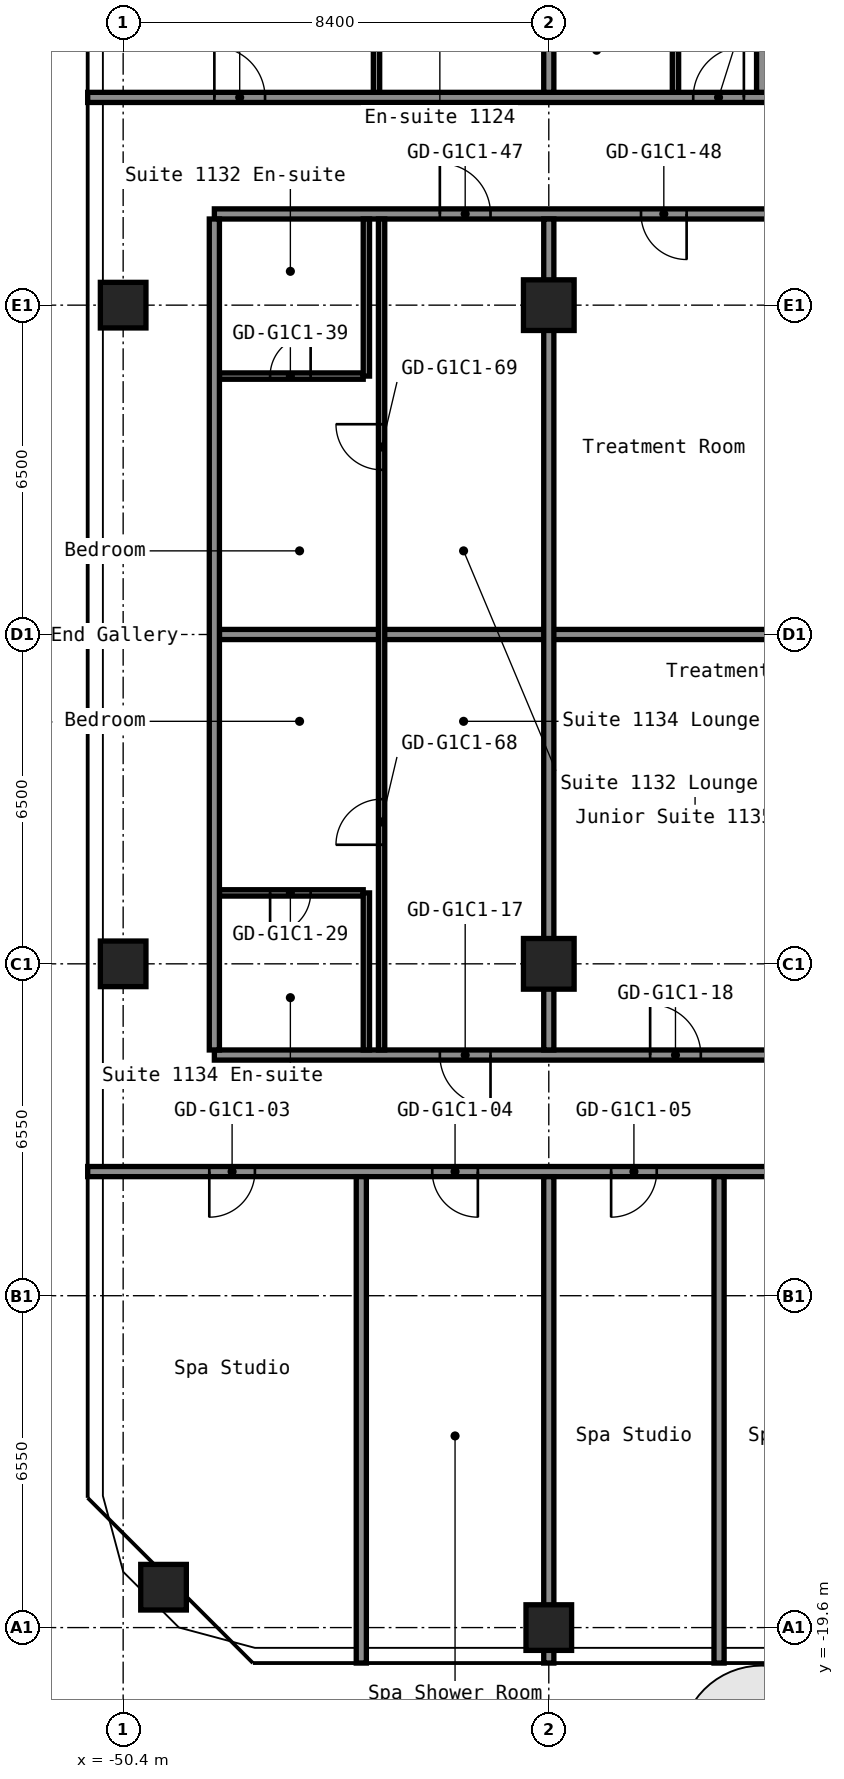
"""IFC4 building model, lengths in metres.
Left out: names, types, materials, properties, quantities, classifications, styles, units other than length and angle.
Written with IfcOpenShell. Run it as: python <this file> out.ifc"""

import sys

from ifc_helpers import new_model, si_unit, direction, frame, frame_2d, origin, origin_2d, place, context, subcontext, project, spatial, rectangle, hollow_rectangle, extrude, element, fill, save


model = new_model("IFC4")
c1 = context("Model", 3, precision=1e-05, world=origin(), true_north=direction((0.0, 1.0)))
c2 = subcontext(c1, "Body", "Model", "MODEL_VIEW")
j1 = project(units=[si_unit("LENGTHUNIT", "METRE"), si_unit("PLANEANGLEUNIT", "RADIAN")], contexts=[c1])
p1 = place(None, origin())
s1 = spatial("IfcSite", under=j1, at=p1, CompositionType="ELEMENT")
p2 = place(p1, origin())
s2 = spatial("IfcBuilding", under=s1, at=p2, CompositionType="ELEMENT")
p3 = place(p2, frame((0.0, 0.0, 42.2)))
s3 = spatial("IfcBuildingStorey", under=s2, at=p3, CompositionType="ELEMENT", Elevation=42.2)
for number, where, z_axis, x_axis in (
    (1, (-49.603, -18.803, 0.0), (0.0, 0.0, 1.0), (1.0, 0.0, 0.0)),
    (2, (-50.4, -6.5, 0.0), (0.0, 0.0, 1.0), (1.0, 0.0, 0.0)),
    (3, (-50.4, 6.5, 0.0), (0.0, 0.0, 1.0), (1.0, 0.0, 0.0)),
    (4, (-42.0, -19.6, 0.0), (0.0, 0.0, 1.0), (1.0, 0.0, 0.0)),
):
    element("IfcColumn", number, at=place(p3, frame(where, z_axis=z_axis, x_axis=x_axis)), inside=s3, PredefinedType="COLUMN", context=c2, shape_type="SweptSolid", body=[
        extrude(hollow_rectangle(XDim=0.9, YDim=0.9, WallThickness=0.036, at=origin_2d()), origin(), (0.0, 0.0, 1.0), 2.8),
    ])
for number, where, z_axis, x_axis in (
    (5, (-42.0, -6.5, 0.0), (0.0, 0.0, 1.0), (1.0, 0.0, 0.0)),
    (6, (-42.0, 6.5, 0.0), (0.0, 0.0, 1.0), (1.0, 0.0, 0.0)),
):
    element("IfcColumn", number, at=place(p3, frame(where, z_axis=z_axis, x_axis=x_axis)), inside=s3, PredefinedType="COLUMN", context=c2, shape_type="SweptSolid", body=[
        extrude(hollow_rectangle(XDim=1.0, YDim=1.0, WallThickness=0.04, at=origin_2d()), origin(), (0.0, 0.0, 1.0), 2.8),
    ])
p4 = place(p3, frame((-51.1, -10.6, 0.0), z_axis=(0.0, 0.0, 1.0), x_axis=(1.0, 0.0, 0.0)))
e7 = element("IfcWall", 7, at=p4, inside=s3, PredefinedType="PARTITIONING", context=c2, shape_type="SweptSolid", body=[
    extrude(rectangle(XDim=34.3, YDim=0.2, at=frame_2d((17.15, 0.0))), origin(), (0.0, 0.0, 1.0), 2.8),
])
p5 = place(p4, frame((2.4, 0.0, 0.0)))
e8 = element("IfcOpeningElement", 8, at=p5, cuts=e7, PredefinedType="OPENING", context=c2, shape_type="SweptSolid", body=[
    extrude(rectangle(XDim=0.9, YDim=2.1, at=frame_2d((0.45, 1.05))), frame((0.0, 0.11, 0.0), z_axis=(0.0, -1.0, 0.0), x_axis=(1.0, 0.0, 0.0)), (0.0, 0.0, 1.0), 0.22),
])
p6 = place(p4, frame((6.8, 0.0, 0.0)))
e9 = element("IfcOpeningElement", 9, at=p6, cuts=e7, PredefinedType="OPENING", context=c2, shape_type="SweptSolid", body=[
    extrude(rectangle(XDim=0.9, YDim=2.1, at=frame_2d((0.45, 1.05))), frame((0.0, 0.11, 0.0), z_axis=(0.0, -1.0, 0.0), x_axis=(1.0, 0.0, 0.0)), (0.0, 0.0, 1.0), 0.22),
])
p7 = place(p4, frame((10.33, 0.0, 0.0)))
e10 = element("IfcOpeningElement", 10, at=p7, cuts=e7, PredefinedType="OPENING", context=c2, shape_type="SweptSolid", body=[
    extrude(rectangle(XDim=0.9, YDim=2.1, at=frame_2d((0.45, 1.05))), frame((0.0, 0.11, 0.0), z_axis=(0.0, -1.0, 0.0), x_axis=(1.0, 0.0, 0.0)), (0.0, 0.0, 1.0), 0.22),
])
p8 = place(p4, frame((14.53, 0.0, 0.0)))
e11 = element("IfcOpeningElement", 11, at=p8, cuts=e7, PredefinedType="OPENING", context=c2, shape_type="SweptSolid", body=[
    extrude(rectangle(XDim=0.9, YDim=2.1, at=frame_2d((0.45, 1.05))), frame((0.0, 0.11, 0.0), z_axis=(0.0, -1.0, 0.0), x_axis=(1.0, 0.0, 0.0)), (0.0, 0.0, 1.0), 0.22),
])
p9 = place(p4, frame((21.2, 0.0, 0.0)))
e12 = element("IfcOpeningElement", 12, at=p9, cuts=e7, PredefinedType="OPENING", context=c2, shape_type="SweptSolid", body=[
    extrude(rectangle(XDim=1.0, YDim=2.1, at=frame_2d((0.5, 1.05))), frame((0.0, 0.11, 0.0), z_axis=(0.0, -1.0, 0.0), x_axis=(1.0, 0.0, 0.0)), (0.0, 0.0, 1.0), 0.22),
])
p10 = place(p4, frame((28.055, 0.0, 0.0)))
e13 = element("IfcOpeningElement", 13, at=p10, cuts=e7, PredefinedType="OPENING", context=c2, shape_type="SweptSolid", body=[
    extrude(rectangle(XDim=0.9, YDim=2.1, at=frame_2d((0.45, 1.05))), frame((0.0, 0.11, 0.0), z_axis=(0.0, -1.0, 0.0), x_axis=(1.0, 0.0, 0.0)), (0.0, 0.0, 1.0), 0.22),
])
p11 = place(p4, frame((32.255, 0.0, 0.0)))
e14 = element("IfcOpeningElement", 14, at=p11, cuts=e7, PredefinedType="OPENING", context=c2, shape_type="SweptSolid", body=[
    extrude(rectangle(XDim=0.9, YDim=2.1, at=frame_2d((0.45, 1.05))), frame((0.0, 0.11, 0.0), z_axis=(0.0, -1.0, 0.0), x_axis=(1.0, 0.0, 0.0)), (0.0, 0.0, 1.0), 0.22),
])
p12 = place(p3, frame((-48.6, -8.3, 0.0), z_axis=(0.0, 0.0, 1.0), x_axis=(1.0, 0.0, 0.0)))
e15 = element("IfcWall", 15, at=p12, inside=s3, PredefinedType="PARTITIONING", context=c2, shape_type="SweptSolid", body=[
    extrude(rectangle(XDim=15.0, YDim=0.2, at=frame_2d((7.5, 0.0))), origin(), (0.0, 0.0, 1.0), 2.8),
])
p13 = place(p12, frame((4.45, 0.0, 0.0)))
e16 = element("IfcOpeningElement", 16, at=p13, cuts=e15, PredefinedType="OPENING", context=c2, shape_type="SweptSolid", body=[
    extrude(rectangle(XDim=1.0, YDim=2.1, at=frame_2d((0.5, 1.05))), frame((0.0, 0.11, 0.0), z_axis=(0.0, -1.0, 0.0), x_axis=(1.0, 0.0, 0.0)), (0.0, 0.0, 1.0), 0.22),
])
p14 = place(p12, frame((8.6, 0.0, 0.0)))
e17 = element("IfcOpeningElement", 17, at=p14, cuts=e15, PredefinedType="OPENING", context=c2, shape_type="SweptSolid", body=[
    extrude(rectangle(XDim=1.0, YDim=2.1, at=frame_2d((0.5, 1.05))), frame((0.0, 0.11, 0.0), z_axis=(0.0, -1.0, 0.0), x_axis=(1.0, 0.0, 0.0)), (0.0, 0.0, 1.0), 0.22),
])
p15 = place(p3, frame((-48.5, -5.1, 0.0), z_axis=(0.0, 0.0, 1.0), x_axis=(1.0, 0.0, 0.0)))
e18 = element("IfcWall", 18, at=p15, inside=s3, PredefinedType="PARTITIONING", context=c2, shape_type="SweptSolid", body=[
    extrude(rectangle(XDim=2.837, YDim=0.125, at=frame_2d((1.419, 0.0))), origin(), (0.0, 0.0, 1.0), 2.8),
])
p16 = place(p15, frame((1.0, 0.0, 0.0)))
e19 = element("IfcOpeningElement", 19, at=p16, cuts=e18, PredefinedType="OPENING", context=c2, shape_type="SweptSolid", body=[
    extrude(rectangle(XDim=0.8, YDim=2.1, at=frame_2d((0.4, 1.05))), frame((0.0, 0.073, 0.0), z_axis=(0.0, -1.0, 0.0), x_axis=(1.0, 0.0, 0.0)), (0.0, 0.0, 1.0), 0.145),
])
p17 = place(p3, frame((-48.5, 0.0, 0.0), z_axis=(0.0, 0.0, 1.0), x_axis=(1.0, 0.0, 0.0)))
e20 = element("IfcWall", 20, at=p17, inside=s3, PredefinedType="PARTITIONING", context=c2, shape_type="SweptSolid", body=[
    extrude(rectangle(XDim=14.9, YDim=0.2, at=frame_2d((7.45, 0.0))), origin(), (0.0, 0.0, 1.0), 2.8),
])
p18 = place(p3, frame((-48.5, 5.1, 0.0), z_axis=(0.0, 0.0, 1.0), x_axis=(1.0, 0.0, 0.0)))
e21 = element("IfcWall", 21, at=p18, inside=s3, PredefinedType="PARTITIONING", context=c2, shape_type="SweptSolid", body=[
    extrude(rectangle(XDim=2.837, YDim=0.125, at=frame_2d((1.419, 0.0))), origin(), (0.0, 0.0, 1.0), 2.8),
])
p19 = place(p18, frame((1.0, 0.0, 0.0)))
e22 = element("IfcOpeningElement", 22, at=p19, cuts=e21, PredefinedType="OPENING", context=c2, shape_type="SweptSolid", body=[
    extrude(rectangle(XDim=0.8, YDim=2.1, at=frame_2d((0.4, 1.05))), frame((0.0, 0.073, 0.0), z_axis=(0.0, -1.0, 0.0), x_axis=(1.0, 0.0, 0.0)), (0.0, 0.0, 1.0), 0.145),
])
p20 = place(p3, frame((-48.6, 8.3, 0.0), z_axis=(0.0, 0.0, 1.0), x_axis=(1.0, 0.0, 0.0)))
e23 = element("IfcWall", 23, at=p20, inside=s3, PredefinedType="PARTITIONING", context=c2, shape_type="SweptSolid", body=[
    extrude(rectangle(XDim=15.0, YDim=0.2, at=frame_2d((7.5, 0.0))), origin(), (0.0, 0.0, 1.0), 2.8),
])
p21 = place(p20, frame((4.45, 0.0, 0.0)))
e24 = element("IfcOpeningElement", 24, at=p21, cuts=e23, PredefinedType="OPENING", context=c2, shape_type="SweptSolid", body=[
    extrude(rectangle(XDim=1.0, YDim=2.1, at=frame_2d((0.5, 1.05))), frame((0.0, 0.11, 0.0), z_axis=(0.0, -1.0, 0.0), x_axis=(1.0, 0.0, 0.0)), (0.0, 0.0, 1.0), 0.22),
])
p22 = place(p20, frame((8.42, 0.0, 0.0)))
e25 = element("IfcOpeningElement", 25, at=p22, cuts=e23, PredefinedType="OPENING", context=c2, shape_type="SweptSolid", body=[
    extrude(rectangle(XDim=0.9, YDim=2.1, at=frame_2d((0.45, 1.05))), frame((0.0, 0.11, 0.0), z_axis=(0.0, -1.0, 0.0), x_axis=(1.0, 0.0, 0.0)), (0.0, 0.0, 1.0), 0.22),
])
p23 = place(p20, frame((12.62, 0.0, 0.0)))
e26 = element("IfcOpeningElement", 26, at=p23, cuts=e23, PredefinedType="OPENING", context=c2, shape_type="SweptSolid", body=[
    extrude(rectangle(XDim=0.9, YDim=2.1, at=frame_2d((0.45, 1.05))), frame((0.0, 0.11, 0.0), z_axis=(0.0, -1.0, 0.0), x_axis=(1.0, 0.0, 0.0)), (0.0, 0.0, 1.0), 0.22),
])
p24 = place(p3, frame((-51.1, 10.6, 0.0), z_axis=(0.0, 0.0, 1.0), x_axis=(1.0, 0.0, 0.0)))
e27 = element("IfcWall", 27, at=p24, inside=s3, PredefinedType="PARTITIONING", context=c2, shape_type="SweptSolid", body=[
    extrude(rectangle(XDim=34.3, YDim=0.2, at=frame_2d((17.15, 0.0))), origin(), (0.0, 0.0, 1.0), 2.8),
])
p25 = place(p24, frame((2.5, 0.0, 0.0)))
e28 = element("IfcOpeningElement", 28, at=p25, cuts=e27, PredefinedType="OPENING", context=c2, shape_type="SweptSolid", body=[
    extrude(rectangle(XDim=1.0, YDim=2.1, at=frame_2d((0.5, 1.05))), frame((0.0, 0.11, 0.0), z_axis=(0.0, -1.0, 0.0), x_axis=(1.0, 0.0, 0.0)), (0.0, 0.0, 1.0), 0.22),
])
p26 = place(p24, frame((11.95, 0.0, 0.0)))
e29 = element("IfcOpeningElement", 29, at=p26, cuts=e27, PredefinedType="OPENING", context=c2, shape_type="SweptSolid", body=[
    extrude(rectangle(XDim=1.0, YDim=2.1, at=frame_2d((0.5, 1.05))), frame((0.0, 0.11, 0.0), z_axis=(0.0, -1.0, 0.0), x_axis=(1.0, 0.0, 0.0)), (0.0, 0.0, 1.0), 0.22),
])
p27 = place(p24, frame((13.65, 0.0, 0.0)))
e30 = element("IfcOpeningElement", 30, at=p27, cuts=e27, PredefinedType="OPENING", context=c2, shape_type="SweptSolid", body=[
    extrude(rectangle(XDim=1.0, YDim=2.1, at=frame_2d((0.5, 1.05))), frame((0.0, 0.11, 0.0), z_axis=(0.0, -1.0, 0.0), x_axis=(1.0, 0.0, 0.0)), (0.0, 0.0, 1.0), 0.22),
])
p28 = place(p24, frame((22.9, 0.0, 0.0)))
e31 = element("IfcOpeningElement", 31, at=p28, cuts=e27, PredefinedType="OPENING", context=c2, shape_type="SweptSolid", body=[
    extrude(rectangle(XDim=1.0, YDim=2.1, at=frame_2d((0.5, 1.05))), frame((0.0, 0.11, 0.0), z_axis=(0.0, -1.0, 0.0), x_axis=(1.0, 0.0, 0.0)), (0.0, 0.0, 1.0), 0.22),
])
p29 = place(p24, frame((28.75, 0.0, 0.0)))
e32 = element("IfcOpeningElement", 32, at=p29, cuts=e27, PredefinedType="OPENING", context=c2, shape_type="SweptSolid", body=[
    extrude(rectangle(XDim=1.0, YDim=2.1, at=frame_2d((0.5, 1.05))), frame((0.0, 0.11, 0.0), z_axis=(0.0, -1.0, 0.0), x_axis=(1.0, 0.0, 0.0)), (0.0, 0.0, 1.0), 0.22),
])
p30 = place(p24, frame((30.45, 0.0, 0.0)))
e33 = element("IfcOpeningElement", 33, at=p30, cuts=e27, PredefinedType="OPENING", context=c2, shape_type="SweptSolid", body=[
    extrude(rectangle(XDim=1.0, YDim=2.1, at=frame_2d((0.5, 1.05))), frame((0.0, 0.11, 0.0), z_axis=(0.0, -1.0, 0.0), x_axis=(1.0, 0.0, 0.0)), (0.0, 0.0, 1.0), 0.22),
])
p31 = place(p3, frame((-48.6, -8.2, 0.0), z_axis=(0.0, 0.0, 1.0), x_axis=(0.0, 1.0, 0.0)))
e34 = element("IfcWall", 34, at=p31, inside=s3, PredefinedType="PARTITIONING", context=c2, shape_type="SweptSolid", body=[
    extrude(rectangle(XDim=16.4, YDim=0.2, at=frame_2d((8.2, 0.0))), origin(), (0.0, 0.0, 1.0), 2.8),
])
p32 = place(p3, frame((-45.7, -20.3, 0.0), z_axis=(0.0, 0.0, 1.0), x_axis=(0.0, 1.0, 0.0)))
e35 = element("IfcWall", 35, at=p32, inside=s3, PredefinedType="PARTITIONING", context=c2, shape_type="SweptSolid", body=[
    extrude(rectangle(XDim=9.6, YDim=0.2, at=frame_2d((4.8, 0.0))), origin(), (0.0, 0.0, 1.0), 2.8),
])
for number, where, z_axis, x_axis in (
    (36, (-45.6, -8.2, 0.0), (0.0, 0.0, 1.0), (0.0, 1.0, 0.0)),
    (37, (-45.6, 5.1, 0.0), (0.0, 0.0, 1.0), (0.0, 1.0, 0.0)),
):
    element("IfcWall", number, at=place(p3, frame(where, z_axis=z_axis, x_axis=x_axis)), inside=s3, PredefinedType="PARTITIONING", context=c2, shape_type="SweptSolid", body=[
        extrude(rectangle(XDim=3.1, YDim=0.125, at=frame_2d((1.55, 0.0))), origin(), (0.0, 0.0, 1.0), 2.8),
    ])
p33 = place(p3, frame((-45.4, 10.7, 0.0), z_axis=(0.0, 0.0, 1.0), x_axis=(0.0, 1.0, 0.0)))
e38 = element("IfcWall", 38, at=p33, inside=s3, PredefinedType="PARTITIONING", context=c2, shape_type="SweptSolid", body=[
    extrude(rectangle(XDim=3.3, YDim=0.125, at=frame_2d((1.65, 0.0))), origin(), (0.0, 0.0, 1.0), 2.8),
])
p34 = place(p3, frame((-45.3, -8.2, 0.0), z_axis=(0.0, 0.0, 1.0), x_axis=(0.0, 1.0, 0.0)))
e39 = element("IfcWall", 39, at=p34, inside=s3, PredefinedType="PARTITIONING", context=c2, shape_type="SweptSolid", body=[
    extrude(rectangle(XDim=16.4, YDim=0.125, at=frame_2d((8.2, 0.0))), origin(), (0.0, 0.0, 1.0), 2.8),
])
p35 = place(p34, frame((4.05, 0.0, 0.0)))
e40 = element("IfcOpeningElement", 40, at=p35, cuts=e39, PredefinedType="OPENING", context=c2, shape_type="SweptSolid", body=[
    extrude(rectangle(XDim=0.9, YDim=2.1, at=frame_2d((0.45, 1.05))), frame((0.0, 0.073, 0.0), z_axis=(0.0, -1.0, 0.0), x_axis=(1.0, 0.0, 0.0)), (0.0, 0.0, 1.0), 0.145),
])
p36 = place(p34, frame((11.45, 0.0, 0.0)))
e41 = element("IfcOpeningElement", 41, at=p36, cuts=e39, PredefinedType="OPENING", context=c2, shape_type="SweptSolid", body=[
    extrude(rectangle(XDim=0.9, YDim=2.1, at=frame_2d((0.45, 1.05))), frame((0.0, 0.073, 0.0), z_axis=(0.0, -1.0, 0.0), x_axis=(1.0, 0.0, 0.0)), (0.0, 0.0, 1.0), 0.145),
])
p37 = place(p3, frame((-42.0, -20.3, 0.0), z_axis=(0.0, 0.0, 1.0), x_axis=(0.0, 1.0, 0.0)))
e42 = element("IfcWall", 42, at=p37, inside=s3, PredefinedType="PARTITIONING", context=c2, shape_type="SweptSolid", body=[
    extrude(rectangle(XDim=9.6, YDim=0.2, at=frame_2d((4.8, 0.0))), origin(), (0.0, 0.0, 1.0), 2.8),
])
p38 = place(p3, frame((-42.0, -8.2, 0.0), z_axis=(0.0, 0.0, 1.0), x_axis=(0.0, 1.0, 0.0)))
e43 = element("IfcWall", 43, at=p38, inside=s3, PredefinedType="PARTITIONING", context=c2, shape_type="SweptSolid", body=[
    extrude(rectangle(XDim=16.4, YDim=0.2, at=frame_2d((8.2, 0.0))), origin(), (0.0, 0.0, 1.0), 2.8),
])
p39 = place(p3, frame((-42.0, 10.7, 0.0), z_axis=(0.0, 0.0, 1.0), x_axis=(0.0, 1.0, 0.0)))
e44 = element("IfcWall", 44, at=p39, inside=s3, PredefinedType="PARTITIONING", context=c2, shape_type="SweptSolid", body=[
    extrude(rectangle(XDim=9.6, YDim=0.2, at=frame_2d((4.8, 0.0))), origin(), (0.0, 0.0, 1.0), 2.8),
])
p40 = place(p3, frame((-39.5, 10.7, 0.0), z_axis=(0.0, 0.0, 1.0), x_axis=(0.0, 1.0, 0.0)))
e45 = element("IfcWall", 45, at=p40, inside=s3, PredefinedType="PARTITIONING", context=c2, shape_type="SweptSolid", body=[
    extrude(rectangle(XDim=2.9, YDim=0.125, at=frame_2d((1.45, 0.0))), origin(), (0.0, 0.0, 1.0), 2.8),
])
p41 = place(p40, frame((1.5, 0.0, 0.0)))
e46 = element("IfcOpeningElement", 46, at=p41, cuts=e45, PredefinedType="OPENING", context=c2, shape_type="SweptSolid", body=[
    extrude(rectangle(XDim=0.8, YDim=2.1, at=frame_2d((0.4, 1.05))), frame((0.0, 0.073, 0.0), z_axis=(0.0, -1.0, 0.0), x_axis=(1.0, 0.0, 0.0)), (0.0, 0.0, 1.0), 0.145),
])
for number, where, z_axis, x_axis in (
    (47, (-38.64, -20.3, 0.0), (0.0, 0.0, 1.0), (0.0, 1.0, 0.0)),
    (48, (-37.8, 10.7, 0.0), (0.0, 0.0, 1.0), (0.0, 1.0, 0.0)),
):
    element("IfcWall", number, at=place(p3, frame(where, z_axis=z_axis, x_axis=x_axis)), inside=s3, PredefinedType="PARTITIONING", context=c2, shape_type="SweptSolid", body=[
        extrude(rectangle(XDim=9.6, YDim=0.2, at=frame_2d((4.8, 0.0))), origin(), (0.0, 0.0, 1.0), 2.8),
    ])
p42 = place(p5, origin())
e49 = element("IfcDoor", 49, at=p42, inside=s3, OperationType="SINGLE_SWING_LEFT", PredefinedType="DOOR", context=c2, shape_type="SweptSolid", body=[
    extrude(rectangle(XDim=0.9, YDim=2.1, at=frame_2d((0.45, 1.05))), frame((0.0, 0.025, 0.0), z_axis=(0.0, -1.0, 0.0), x_axis=(1.0, 0.0, 0.0)), (0.0, 0.0, 1.0), 0.05),
])
fill(e8, e49)
p43 = place(p6, origin())
e50 = element("IfcDoor", 50, at=p43, inside=s3, OperationType="SINGLE_SWING_RIGHT", PredefinedType="DOOR", context=c2, shape_type="SweptSolid", body=[
    extrude(rectangle(XDim=0.9, YDim=2.1, at=frame_2d((0.45, 1.05))), frame((0.0, 0.025, 0.0), z_axis=(0.0, -1.0, 0.0), x_axis=(1.0, 0.0, 0.0)), (0.0, 0.0, 1.0), 0.05),
])
fill(e9, e50)
p44 = place(p7, origin())
e51 = element("IfcDoor", 51, at=p44, inside=s3, OperationType="SINGLE_SWING_LEFT", PredefinedType="DOOR", context=c2, shape_type="SweptSolid", body=[
    extrude(rectangle(XDim=0.9, YDim=2.1, at=frame_2d((0.45, 1.05))), frame((0.0, 0.025, 0.0), z_axis=(0.0, -1.0, 0.0), x_axis=(1.0, 0.0, 0.0)), (0.0, 0.0, 1.0), 0.05),
])
fill(e10, e51)
p45 = place(p13, origin())
e52 = element("IfcDoor", 52, at=p45, inside=s3, OperationType="SINGLE_SWING_RIGHT", PredefinedType="DOOR", context=c2, shape_type="SweptSolid", body=[
    extrude(rectangle(XDim=1.0, YDim=2.1, at=frame_2d((0.5, 1.05))), frame((0.0, 0.025, 0.0), z_axis=(0.0, -1.0, 0.0), x_axis=(1.0, 0.0, 0.0)), (0.0, 0.0, 1.0), 0.05),
])
fill(e16, e52)
p46 = place(p14, origin())
e53 = element("IfcDoor", 53, at=p46, inside=s3, OperationType="SINGLE_SWING_RIGHT", PredefinedType="DOOR", context=c2, shape_type="SweptSolid", body=[
    extrude(rectangle(XDim=1.0, YDim=2.1, at=frame_2d((0.5, 1.05))), frame((0.0, 0.025, 0.0), z_axis=(0.0, -1.0, 0.0), x_axis=(1.0, 0.0, 0.0)), (0.0, 0.0, 1.0), 0.05),
])
fill(e17, e53)
p47 = place(p16, origin())
e54 = element("IfcDoor", 54, at=p47, inside=s3, OperationType="SINGLE_SWING_LEFT", PredefinedType="DOOR", context=c2, shape_type="SweptSolid", body=[
    extrude(rectangle(XDim=0.8, YDim=2.1, at=frame_2d((0.4, 1.05))), frame((0.0, 0.025, 0.0), z_axis=(0.0, -1.0, 0.0), x_axis=(1.0, 0.0, 0.0)), (0.0, 0.0, 1.0), 0.05),
])
fill(e19, e54)
p48 = place(p19, origin())
e55 = element("IfcDoor", 55, at=p48, inside=s3, OperationType="SINGLE_SWING_LEFT", PredefinedType="DOOR", context=c2, shape_type="SweptSolid", body=[
    extrude(rectangle(XDim=0.8, YDim=2.1, at=frame_2d((0.4, 1.05))), frame((0.0, 0.025, 0.0), z_axis=(0.0, -1.0, 0.0), x_axis=(1.0, 0.0, 0.0)), (0.0, 0.0, 1.0), 0.05),
])
fill(e22, e55)
p49 = place(p21, origin())
e56 = element("IfcDoor", 56, at=p49, inside=s3, OperationType="SINGLE_SWING_RIGHT", PredefinedType="DOOR", context=c2, shape_type="SweptSolid", body=[
    extrude(rectangle(XDim=1.0, YDim=2.1, at=frame_2d((0.5, 1.05))), frame((0.0, 0.025, 0.0), z_axis=(0.0, -1.0, 0.0), x_axis=(1.0, 0.0, 0.0)), (0.0, 0.0, 1.0), 0.05),
])
fill(e24, e56)
p50 = place(p22, origin())
e57 = element("IfcDoor", 57, at=p50, inside=s3, OperationType="SINGLE_SWING_RIGHT", PredefinedType="DOOR", context=c2, shape_type="SweptSolid", body=[
    extrude(rectangle(XDim=0.9, YDim=2.1, at=frame_2d((0.45, 1.05))), frame((0.0, 0.025, 0.0), z_axis=(0.0, -1.0, 0.0), x_axis=(1.0, 0.0, 0.0)), (0.0, 0.0, 1.0), 0.05),
])
fill(e25, e57)
p51 = place(p25, origin())
e58 = element("IfcDoor", 58, at=p51, inside=s3, OperationType="SINGLE_SWING_RIGHT", PredefinedType="DOOR", context=c2, shape_type="SweptSolid", body=[
    extrude(rectangle(XDim=1.0, YDim=2.1, at=frame_2d((0.5, 1.05))), frame((0.0, 0.025, 0.0), z_axis=(0.0, -1.0, 0.0), x_axis=(1.0, 0.0, 0.0)), (0.0, 0.0, 1.0), 0.05),
])
fill(e28, e58)
p52 = place(p26, origin())
e59 = element("IfcDoor", 59, at=p52, inside=s3, OperationType="SINGLE_SWING_LEFT", PredefinedType="DOOR", context=c2, shape_type="SweptSolid", body=[
    extrude(rectangle(XDim=1.0, YDim=2.1, at=frame_2d((0.5, 1.05))), frame((0.0, 0.025, 0.0), z_axis=(0.0, -1.0, 0.0), x_axis=(1.0, 0.0, 0.0)), (0.0, 0.0, 1.0), 0.05),
])
fill(e29, e59)
p53 = place(p35, origin())
e60 = element("IfcDoor", 60, at=p53, inside=s3, OperationType="SINGLE_SWING_RIGHT", PredefinedType="DOOR", context=c2, shape_type="SweptSolid", body=[
    extrude(rectangle(XDim=0.9, YDim=2.1, at=frame_2d((0.45, 1.05))), frame((0.0, 0.025, 0.0), z_axis=(0.0, -1.0, 0.0), x_axis=(1.0, 0.0, 0.0)), (0.0, 0.0, 1.0), 0.05),
])
fill(e40, e60)
p54 = place(p36, origin())
e61 = element("IfcDoor", 61, at=p54, inside=s3, OperationType="SINGLE_SWING_LEFT", PredefinedType="DOOR", context=c2, shape_type="SweptSolid", body=[
    extrude(rectangle(XDim=0.9, YDim=2.1, at=frame_2d((0.45, 1.05))), frame((0.0, 0.025, 0.0), z_axis=(0.0, -1.0, 0.0), x_axis=(1.0, 0.0, 0.0)), (0.0, 0.0, 1.0), 0.05),
])
fill(e41, e61)
save(model, sys.argv[1])
